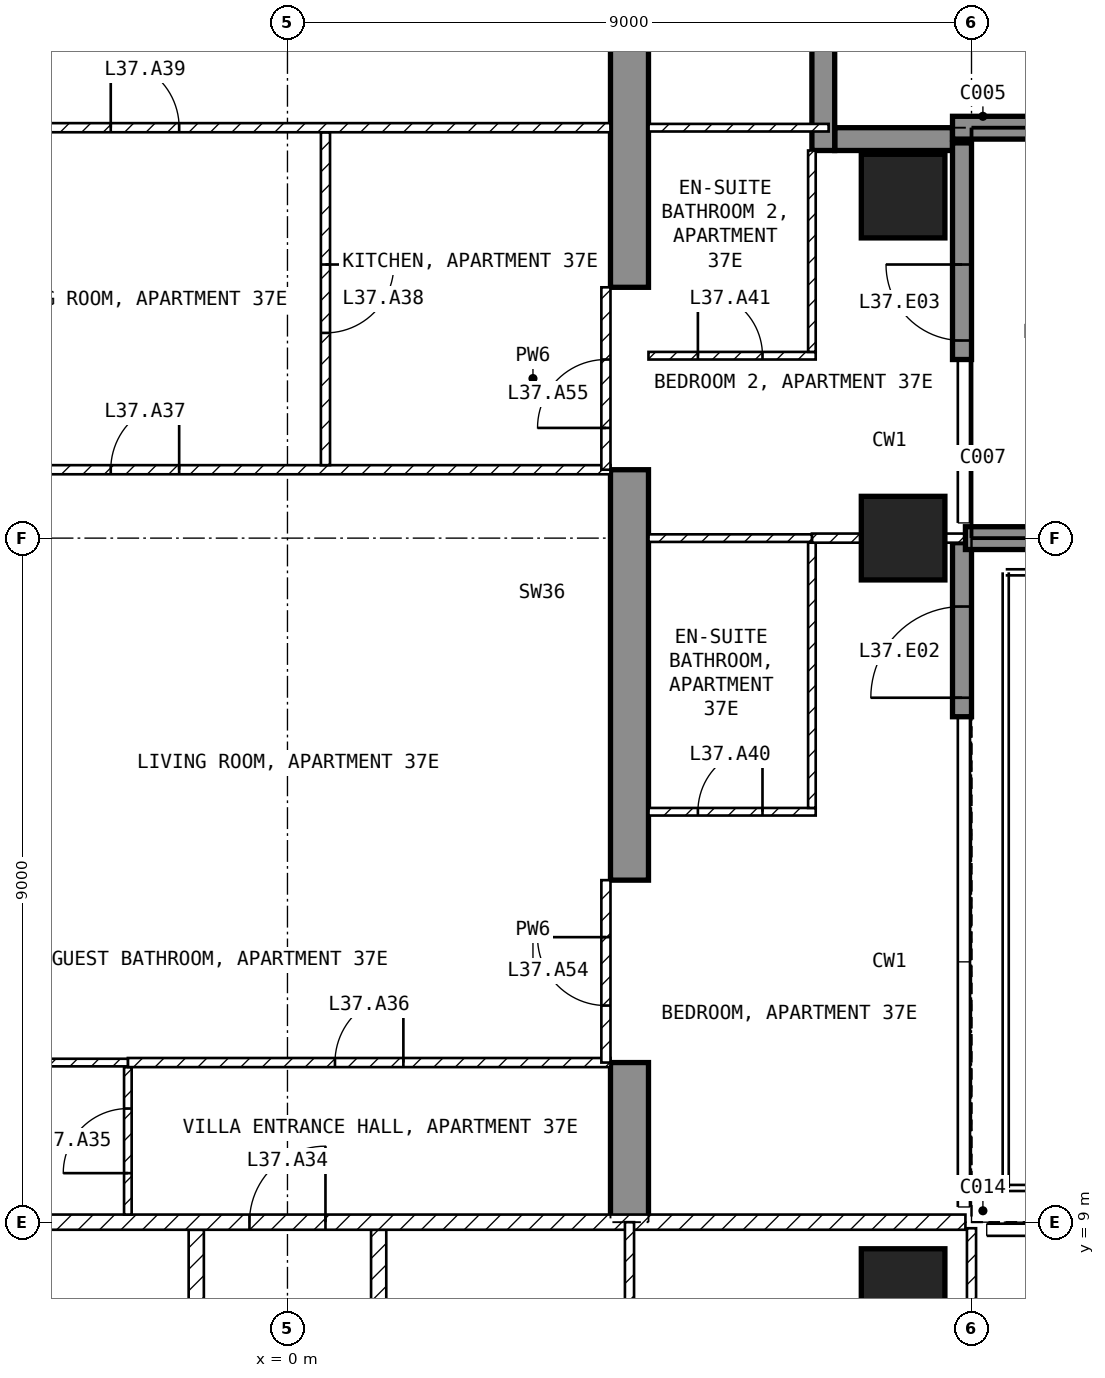
"""IFC4 building model, lengths in metres.
Left out: names, types, materials, properties, quantities, classifications, styles, units other than length and angle.
Written with IfcOpenShell. Run it as: python <this file> out.ifc"""

import sys

from ifc_helpers import new_model, si_unit, direction, frame, frame_2d, origin, origin_2d, place, context, subcontext, project, spatial, polyline, rectangle, outline, extrude, element, fill, save


model = new_model("IFC4")
c1 = context("Model", 3, precision=1e-05, world=origin(), true_north=direction((0.0, 1.0)))
c2 = subcontext(c1, "Body", "Model", "MODEL_VIEW")
j1 = project(units=[si_unit("LENGTHUNIT", "METRE"), si_unit("PLANEANGLEUNIT", "RADIAN")], contexts=[c1])
p1 = place(None, origin())
s1 = spatial("IfcSite", under=j1, at=p1, CompositionType="ELEMENT")
p2 = place(p1, origin())
s2 = spatial("IfcBuilding", under=s1, at=p2, CompositionType="ELEMENT")
p3 = place(p2, frame((0.0, 0.0, 151.4)))
s3 = spatial("IfcBuildingStorey", under=s2, at=p3, CompositionType="ELEMENT", Elevation=151.4)
for number, where, z_axis, x_axis in (
    (1, (8.1, 8.1, -0.25), (0.0, 0.0, 1.0), (1.0, 0.0, 0.0)),
    (2, (8.1, 18.0, -0.25), (0.0, 0.0, 1.0), (1.0, 0.0, 0.0)),
    (3, (8.1, 22.5, -0.25), (0.0, 0.0, 1.0), (1.0, 0.0, 0.0)),
):
    element("IfcColumn", number, at=place(p3, frame(where, z_axis=z_axis, x_axis=x_axis)), inside=s3, PredefinedType="COLUMN", context=c2, shape_type="SweptSolid", body=[
        extrude(rectangle(XDim=1.1, YDim=1.1, at=origin_2d()), origin(), (0.0, 0.0, 1.0), 3.45),
    ])
p4 = place(p3, frame((4.25, 9.0, -0.25), z_axis=(1.0, 0.0, 0.0), x_axis=(0.0, 1.0, 0.0)))
e4 = element("IfcWall", 4, at=p4, inside=s3, PredefinedType="SHEAR", context=c2, shape_type="SweptSolid", body=[
    extrude(outline(polyline([(0.0, 0.0), (2.1, 0.0), (2.1, 2.65), (4.5, 2.65), (4.5, 0.0), (9.9, 0.0), (9.9, 2.65), (12.3, 2.65), (12.3, 0.0), (16.55, 0.0), (16.55, 3.45), (0.0, 3.45), (0.0, 0.0)])), origin(), (0.0, 0.0, 1.0), 0.5),
])
p5 = place(p3, frame((8.875, 15.65, 0.0), z_axis=(0.0, 0.0, 1.0), x_axis=(0.0, 1.0, 0.0)))
e5 = element("IfcWall", 5, at=p5, inside=s3, PredefinedType="SOLIDWALL", context=c2, shape_type="SweptSolid", body=[
    extrude(rectangle(XDim=2.29, YDim=0.25, at=frame_2d((1.145, 0.0))), origin(), (0.0, 0.0, 1.0), 3.2),
])
p6 = place(p5, frame((0.25, 0.0, 0.0)))
e6 = element("IfcOpeningElement", 6, at=p6, cuts=e5, PredefinedType="OPENING", context=c2, shape_type="SweptSolid", body=[
    extrude(rectangle(XDim=1.2, YDim=2.4, at=frame_2d((0.6, 1.2))), frame((0.0, 0.135, 0.0), z_axis=(0.0, -1.0, 0.0), x_axis=(1.0, 0.0, 0.0)), (0.0, 0.0, 1.0), 0.27),
])
p7 = place(p3, frame((8.875, 20.35, 0.0), z_axis=(0.0, 0.0, 1.0), x_axis=(0.0, 1.0, 0.0)))
e7 = element("IfcWall", 7, at=p7, inside=s3, PredefinedType="SOLIDWALL", context=c2, shape_type="SweptSolid", body=[
    extrude(rectangle(XDim=2.85, YDim=0.25, at=frame_2d((1.425, 0.0))), origin(), (0.0, 0.0, 1.0), 3.2),
])
p8 = place(p7, frame((0.25, 0.0, 0.0)))
e8 = element("IfcOpeningElement", 8, at=p8, cuts=e7, PredefinedType="OPENING", context=c2, shape_type="SweptSolid", body=[
    extrude(rectangle(XDim=1.0, YDim=2.4, at=frame_2d((0.5, 1.2))), frame((0.0, 0.135, 0.0), z_axis=(0.0, -1.0, 0.0), x_axis=(1.0, 0.0, 0.0)), (0.0, 0.0, 1.0), 0.27),
])
p9 = place(p3, frame((8.75, 23.25, 0.0), z_axis=(0.0, 0.0, 1.0), x_axis=(-1.0, 0.0, 0.0)))
e9 = element("IfcWall", 9, at=p9, inside=s3, PredefinedType="SOLIDWALL", context=c2, shape_type="SweptSolid", body=[
    extrude(rectangle(XDim=1.55, YDim=0.3, at=frame_2d((0.775, 0.0))), origin(), (0.0, 0.0, 1.0), 3.2),
])
p10 = place(p3, frame((7.05, 23.1, 0.0), z_axis=(0.0, 0.0, 1.0), x_axis=(0.0, 1.0, 0.0)))
e10 = element("IfcWall", 10, at=p10, inside=s3, PredefinedType="SOLIDWALL", context=c2, shape_type="SweptSolid", body=[
    extrude(rectangle(XDim=1.8, YDim=0.3, at=frame_2d((0.9, 0.0))), origin(), (0.0, 0.0, 1.0), 3.2),
])
p11 = place(p3, frame((8.92, 18.0, 0.0), z_axis=(0.0, 0.0, 1.0), x_axis=(1.0, 0.0, 0.0)))
e11 = element("IfcWall", 11, at=p11, inside=s3, PredefinedType="SOLIDWALL", context=c2, shape_type="SweptSolid", body=[
    extrude(rectangle(XDim=2.82, YDim=0.3, at=frame_2d((1.41, 0.0))), origin(), (0.0, 0.0, 1.0), 3.2),
])
p12 = place(p3, frame((8.75, 23.4, 0.0), z_axis=(0.0, 0.0, 1.0), x_axis=(1.0, 0.0, 0.0)))
e12 = element("IfcWall", 12, at=p12, inside=s3, PredefinedType="SOLIDWALL", context=c2, shape_type="SweptSolid", body=[
    extrude(rectangle(XDim=2.95, YDim=0.3, at=frame_2d((1.475, 0.0))), origin(), (0.0, 0.0, 1.0), 3.2),
])
for number, where, z_axis, x_axis in (
    (13, (1.2, 8.9, 0.0), (0.0, 0.0, 1.0), (0.0, -1.0, 0.0)),
    (14, (-1.2, 4.6, 0.0), (0.0, 0.0, 1.0), (0.0, 1.0, 0.0)),
):
    element("IfcWall", number, at=place(p3, frame(where, z_axis=z_axis, x_axis=x_axis)), inside=s3, PredefinedType="PARTITIONING", context=c2, shape_type="SweptSolid", body=[
        extrude(rectangle(XDim=4.3, YDim=0.2, at=frame_2d((2.15, 0.0))), origin(), (0.0, 0.0, 1.0), 3.2),
    ])
p13 = place(p3, frame((-8.92, 9.0, 0.0), z_axis=(0.0, 0.0, 1.0), x_axis=(1.0, 0.0, 0.0)))
e15 = element("IfcWall", 15, at=p13, inside=s3, PredefinedType="PARTITIONING", context=c2, shape_type="SweptSolid", body=[
    extrude(rectangle(XDim=17.84, YDim=0.2, at=frame_2d((8.92, 0.0))), origin(), (0.0, 0.0, 1.0), 3.2),
])
p14 = place(p13, frame((8.42, 0.0, 0.0)))
e16 = element("IfcOpeningElement", 16, at=p14, cuts=e15, PredefinedType="OPENING", context=c2, shape_type="SweptSolid", body=[
    extrude(rectangle(XDim=1.0, YDim=2.1, at=frame_2d((0.5, 1.05))), frame((0.0, 0.11, 0.0), z_axis=(0.0, -1.0, 0.0), x_axis=(1.0, 0.0, 0.0)), (0.0, 0.0, 1.0), 0.22),
])
p15 = place(p3, frame((9.0, 4.8, 0.0), z_axis=(0.0, 0.0, 1.0), x_axis=(0.0, 1.0, 0.0)))
e17 = element("IfcWall", 17, at=p15, inside=s3, PredefinedType="PARTITIONING", context=c2, shape_type="SweptSolid", body=[
    extrude(rectangle(XDim=4.12, YDim=0.12, at=frame_2d((2.06, 0.0))), origin(), (0.0, 0.0, 1.0), 3.2),
])
p16 = place(p15, frame((0.7, 0.0, 0.0)))
e18 = element("IfcOpeningElement", 18, at=p16, cuts=e17, PredefinedType="OPENING", context=c2, shape_type="SweptSolid", body=[
    extrude(rectangle(XDim=0.9, YDim=2.1, at=frame_2d((0.45, 1.05))), frame((0.0, 0.07, 0.0), z_axis=(0.0, -1.0, 0.0), x_axis=(1.0, 0.0, 0.0)), (0.0, 0.0, 1.0), 0.14),
])
p17 = place(p3, frame((4.5, 4.5, 0.0), z_axis=(0.0, 0.0, 1.0), x_axis=(0.0, 1.0, 0.0)))
e19 = element("IfcWall", 19, at=p17, inside=s3, PredefinedType="PARTITIONING", context=c2, shape_type="SweptSolid", body=[
    extrude(rectangle(XDim=4.5, YDim=0.12, at=frame_2d((2.25, 0.0))), origin(), (0.0, 0.0, 1.0), 3.2),
])
p18 = place(p17, frame((1.8, 0.0, 0.0)))
e20 = element("IfcOpeningElement", 20, at=p18, cuts=e19, PredefinedType="OPENING", context=c2, shape_type="SweptSolid", body=[
    extrude(rectangle(XDim=0.9, YDim=2.1, at=frame_2d((0.45, 1.05))), frame((0.0, 0.07, 0.0), z_axis=(0.0, -1.0, 0.0), x_axis=(1.0, 0.0, 0.0)), (0.0, 0.0, 1.0), 0.14),
])
p19 = place(p3, frame((-2.1, 9.1, 0.0), z_axis=(0.0, 0.0, 1.0), x_axis=(0.0, 1.0, 0.0)))
e21 = element("IfcWall", 21, at=p19, inside=s3, PredefinedType="PARTITIONING", context=c2, shape_type="SweptSolid", body=[
    extrude(rectangle(XDim=1.94, YDim=0.1, at=frame_2d((0.97, 0.0))), origin(), (0.0, 0.0, 1.0), 3.2),
])
p20 = place(p19, frame((0.545, 0.0, 0.0)))
e22 = element("IfcOpeningElement", 22, at=p20, cuts=e21, PredefinedType="OPENING", context=c2, shape_type="SweptSolid", body=[
    extrude(rectangle(XDim=0.85, YDim=2.1, at=frame_2d((0.425, 1.05))), frame((0.0, 0.06, 0.0), z_axis=(0.0, -1.0, 0.0), x_axis=(1.0, 0.0, 0.0)), (0.0, 0.0, 1.0), 0.12),
])
p21 = place(p3, frame((-2.1, 11.1, 0.0), z_axis=(0.0, 0.0, 1.0), x_axis=(1.0, 0.0, 0.0)))
e23 = element("IfcWall", 23, at=p21, inside=s3, PredefinedType="PARTITIONING", context=c2, shape_type="SweptSolid", body=[
    extrude(rectangle(XDim=6.35, YDim=0.12, at=frame_2d((3.175, 0.0))), origin(), (0.0, 0.0, 1.0), 3.2),
])
p22 = place(p21, frame((2.725, 0.0, 0.0)))
e24 = element("IfcOpeningElement", 24, at=p22, cuts=e23, PredefinedType="OPENING", context=c2, shape_type="SweptSolid", body=[
    extrude(rectangle(XDim=0.9, YDim=2.1, at=frame_2d((0.45, 1.05))), frame((0.0, 0.07, 0.0), z_axis=(0.0, -1.0, 0.0), x_axis=(1.0, 0.0, 0.0)), (0.0, 0.0, 1.0), 0.14),
])
p23 = place(p3, frame((-4.25, 11.1, 0.0), z_axis=(0.0, 0.0, 1.0), x_axis=(1.0, 0.0, 0.0)))
e25 = element("IfcWall", 25, at=p23, inside=s3, PredefinedType="PARTITIONING", context=c2, shape_type="SweptSolid", body=[
    extrude(rectangle(XDim=2.15, YDim=0.1, at=frame_2d((1.075, 0.0))), origin(), (0.0, 0.0, 1.0), 3.2),
])
p24 = place(p3, frame((-4.25, 18.9, 0.0), z_axis=(0.0, 0.0, 1.0), x_axis=(1.0, 0.0, 0.0)))
e26 = element("IfcWall", 26, at=p24, inside=s3, PredefinedType="PARTITIONING", context=c2, shape_type="SweptSolid", body=[
    extrude(rectangle(XDim=8.5, YDim=0.12, at=frame_2d((4.25, 0.0))), origin(), (0.0, 0.0, 1.0), 3.2),
])
p25 = place(p24, frame((1.925, 0.0, 0.0)))
e27 = element("IfcOpeningElement", 27, at=p25, cuts=e26, PredefinedType="OPENING", context=c2, shape_type="SweptSolid", body=[
    extrude(rectangle(XDim=0.9, YDim=2.1, at=frame_2d((0.45, 1.05))), frame((0.0, 0.07, 0.0), z_axis=(0.0, -1.0, 0.0), x_axis=(1.0, 0.0, 0.0)), (0.0, 0.0, 1.0), 0.14),
])
p26 = place(p3, frame((0.5, 23.34, 0.0), z_axis=(0.0, 0.0, 1.0), x_axis=(0.0, -1.0, 0.0)))
e28 = element("IfcWall", 28, at=p26, inside=s3, PredefinedType="PARTITIONING", context=c2, shape_type="SweptSolid", body=[
    extrude(rectangle(XDim=4.38, YDim=0.12, at=frame_2d((2.19, 0.0))), origin(), (0.0, 0.0, 1.0), 3.2),
])
p27 = place(p26, frame((1.74, 0.0, 0.0)))
e29 = element("IfcOpeningElement", 29, at=p27, cuts=e28, PredefinedType="OPENING", context=c2, shape_type="SweptSolid", body=[
    extrude(rectangle(XDim=0.9, YDim=2.1, at=frame_2d((0.45, 1.05))), frame((0.0, 0.07, 0.0), z_axis=(0.0, -1.0, 0.0), x_axis=(1.0, 0.0, 0.0)), (0.0, 0.0, 1.0), 0.14),
])
p28 = place(p3, frame((-4.25, 23.4, 0.0), z_axis=(0.0, 0.0, 1.0), x_axis=(1.0, 0.0, 0.0)))
e30 = element("IfcWall", 30, at=p28, inside=s3, PredefinedType="PARTITIONING", context=c2, shape_type="SweptSolid", body=[
    extrude(rectangle(XDim=8.5, YDim=0.12, at=frame_2d((4.25, 0.0))), origin(), (0.0, 0.0, 1.0), 3.2),
])
p29 = place(p28, frame((1.925, 0.0, 0.0)))
e31 = element("IfcOpeningElement", 31, at=p29, cuts=e30, PredefinedType="OPENING", context=c2, shape_type="SweptSolid", body=[
    extrude(rectangle(XDim=0.9, YDim=2.1, at=frame_2d((0.45, 1.05))), frame((0.0, 0.07, 0.0), z_axis=(0.0, -1.0, 0.0), x_axis=(1.0, 0.0, 0.0)), (0.0, 0.0, 1.0), 0.14),
])
p30 = place(p3, frame((4.75, 14.4, 0.0), z_axis=(0.0, 0.0, 1.0), x_axis=(1.0, 0.0, 0.0)))
e32 = element("IfcWall", 32, at=p30, inside=s3, PredefinedType="PARTITIONING", context=c2, shape_type="SweptSolid", body=[
    extrude(rectangle(XDim=2.2, YDim=0.1, at=frame_2d((1.1, 0.0))), origin(), (0.0, 0.0, 1.0), 3.2),
])
p31 = place(p30, frame((0.65, 0.0, 0.0)))
e33 = element("IfcOpeningElement", 33, at=p31, cuts=e32, PredefinedType="OPENING", context=c2, shape_type="SweptSolid", body=[
    extrude(rectangle(XDim=0.85, YDim=2.1, at=frame_2d((0.425, 1.05))), frame((0.0, 0.06, 0.0), z_axis=(0.0, -1.0, 0.0), x_axis=(1.0, 0.0, 0.0)), (0.0, 0.0, 1.0), 0.12),
])
p32 = place(p3, frame((6.9, 14.45, 0.0), z_axis=(0.0, 0.0, 1.0), x_axis=(0.0, 1.0, 0.0)))
e34 = element("IfcWall", 34, at=p32, inside=s3, PredefinedType="PARTITIONING", context=c2, shape_type="SweptSolid", body=[
    extrude(rectangle(XDim=3.49, YDim=0.1, at=frame_2d((1.745, 0.0))), origin(), (0.0, 0.0, 1.0), 3.2),
])
p33 = place(p3, frame((6.9, 18.0, 0.0), z_axis=(0.0, 0.0, 1.0), x_axis=(1.0, 0.0, 0.0)))
e35 = element("IfcWall", 35, at=p33, inside=s3, PredefinedType="PARTITIONING", context=c2, shape_type="SweptSolid", body=[
    extrude(rectangle(XDim=2.02, YDim=0.12, at=frame_2d((1.01, 0.0))), origin(), (0.0, 0.0, 1.0), 2.364),
])
p34 = place(p3, frame((4.75, 18.0, 0.0), z_axis=(0.0, 0.0, 1.0), x_axis=(1.0, 0.0, 0.0)))
e36 = element("IfcWall", 36, at=p34, inside=s3, PredefinedType="PARTITIONING", context=c2, shape_type="SweptSolid", body=[
    extrude(rectangle(XDim=2.15, YDim=0.1, at=frame_2d((1.075, 0.0))), origin(), (0.0, 0.0, 1.0), 2.364),
])
p35 = place(p3, frame((4.75, 20.4, 0.0), z_axis=(0.0, 0.0, 1.0), x_axis=(1.0, 0.0, 0.0)))
e37 = element("IfcWall", 37, at=p35, inside=s3, PredefinedType="PARTITIONING", context=c2, shape_type="SweptSolid", body=[
    extrude(rectangle(XDim=2.2, YDim=0.1, at=frame_2d((1.1, 0.0))), origin(), (0.0, 0.0, 1.0), 3.2),
])
p36 = place(p35, frame((0.65, 0.0, 0.0)))
e38 = element("IfcOpeningElement", 38, at=p36, cuts=e37, PredefinedType="OPENING", context=c2, shape_type="SweptSolid", body=[
    extrude(rectangle(XDim=0.85, YDim=2.1, at=frame_2d((0.425, 1.05))), frame((0.0, 0.06, 0.0), z_axis=(0.0, -1.0, 0.0), x_axis=(1.0, 0.0, 0.0)), (0.0, 0.0, 1.0), 0.12),
])
p37 = place(p3, frame((6.9, 20.45, 0.0), z_axis=(0.0, 0.0, 1.0), x_axis=(0.0, 1.0, 0.0)))
e39 = element("IfcWall", 39, at=p37, inside=s3, PredefinedType="PARTITIONING", context=c2, shape_type="SweptSolid", body=[
    extrude(rectangle(XDim=2.65, YDim=0.1, at=frame_2d((1.325, 0.0))), origin(), (0.0, 0.0, 1.0), 3.2),
])
p38 = place(p3, frame((4.75, 23.4, 0.0), z_axis=(0.0, 0.0, 1.0), x_axis=(1.0, 0.0, 0.0)))
e40 = element("IfcWall", 40, at=p38, inside=s3, PredefinedType="PARTITIONING", context=c2, shape_type="SweptSolid", body=[
    extrude(rectangle(XDim=2.37, YDim=0.1, at=frame_2d((1.185, 0.0))), origin(), (0.0, 0.0, 1.0), 3.2),
])
p39 = place(p3, frame((4.19, 11.1, 0.0), z_axis=(0.0, 0.0, 1.0), x_axis=(0.0, 1.0, 0.0)))
e41 = element("IfcWall", 41, at=p39, inside=s3, PredefinedType="PARTITIONING", context=c2, shape_type="SweptSolid", body=[
    extrude(rectangle(XDim=2.4, YDim=0.12, at=frame_2d((1.2, 0.0))), origin(), (0.0, 0.0, 1.0), 2.4),
])
p40 = place(p39, frame((0.75, 0.0, 0.0)))
e42 = element("IfcOpeningElement", 42, at=p40, cuts=e41, PredefinedType="OPENING", context=c2, shape_type="SweptSolid", body=[
    extrude(rectangle(XDim=0.9, YDim=2.1, at=frame_2d((0.45, 1.05))), frame((0.0, 0.07, 0.0), z_axis=(0.0, -1.0, 0.0), x_axis=(1.0, 0.0, 0.0)), (0.0, 0.0, 1.0), 0.14),
])
p41 = place(p3, frame((4.19, 18.9, 0.0), z_axis=(0.0, 0.0, 1.0), x_axis=(0.0, 1.0, 0.0)))
e43 = element("IfcWall", 43, at=p41, inside=s3, PredefinedType="PARTITIONING", context=c2, shape_type="SweptSolid", body=[
    extrude(rectangle(XDim=2.4, YDim=0.12, at=frame_2d((1.2, 0.0))), origin(), (0.0, 0.0, 1.0), 2.4),
])
p42 = place(p41, frame((0.55, 0.0, 0.0)))
e44 = element("IfcOpeningElement", 44, at=p42, cuts=e43, PredefinedType="OPENING", context=c2, shape_type="SweptSolid", body=[
    extrude(rectangle(XDim=0.9, YDim=2.1, at=frame_2d((0.45, 1.05))), frame((0.0, 0.07, 0.0), z_axis=(0.0, -1.0, 0.0), x_axis=(1.0, 0.0, 0.0)), (0.0, 0.0, 1.0), 0.14),
])
p43 = place(p6, origin())
e45 = element("IfcDoor", 45, at=p43, inside=s3, OperationType="SINGLE_SWING_LEFT", PredefinedType="DOOR", context=c2, shape_type="SweptSolid", body=[
    extrude(rectangle(XDim=1.2, YDim=2.4, at=frame_2d((0.6, 1.2))), frame((0.0, 0.025, 0.0), z_axis=(0.0, -1.0, 0.0), x_axis=(1.0, 0.0, 0.0)), (0.0, 0.0, 1.0), 0.05),
])
fill(e6, e45)
p44 = place(p8, origin())
e46 = element("IfcDoor", 46, at=p44, inside=s3, OperationType="SINGLE_SWING_RIGHT", PredefinedType="DOOR", context=c2, shape_type="SweptSolid", body=[
    extrude(rectangle(XDim=1.0, YDim=2.4, at=frame_2d((0.5, 1.2))), frame((0.0, 0.025, 0.0), z_axis=(0.0, -1.0, 0.0), x_axis=(1.0, 0.0, 0.0)), (0.0, 0.0, 1.0), 0.05),
])
fill(e8, e46)
p45 = place(p14, origin())
e47 = element("IfcDoor", 47, at=p45, inside=s3, OperationType="SINGLE_SWING_RIGHT", PredefinedType="DOOR", context=c2, shape_type="SweptSolid", body=[
    extrude(rectangle(XDim=1.0, YDim=2.1, at=frame_2d((0.5, 1.05))), frame((0.0, 0.025, 0.0), z_axis=(0.0, -1.0, 0.0), x_axis=(1.0, 0.0, 0.0)), (0.0, 0.0, 1.0), 0.05),
])
fill(e16, e47)
p46 = place(p20, origin())
e48 = element("IfcDoor", 48, at=p46, inside=s3, OperationType="SINGLE_SWING_LEFT", PredefinedType="DOOR", context=c2, shape_type="SweptSolid", body=[
    extrude(rectangle(XDim=0.85, YDim=2.1, at=frame_2d((0.425, 1.05))), frame((0.0, 0.025, 0.0), z_axis=(0.0, -1.0, 0.0), x_axis=(1.0, 0.0, 0.0)), (0.0, 0.0, 1.0), 0.05),
])
fill(e22, e48)
p47 = place(p22, origin())
e49 = element("IfcDoor", 49, at=p47, inside=s3, OperationType="SINGLE_SWING_RIGHT", PredefinedType="DOOR", context=c2, shape_type="SweptSolid", body=[
    extrude(rectangle(XDim=0.9, YDim=2.1, at=frame_2d((0.45, 1.05))), frame((0.0, 0.025, 0.0), z_axis=(0.0, -1.0, 0.0), x_axis=(1.0, 0.0, 0.0)), (0.0, 0.0, 1.0), 0.05),
])
fill(e24, e49)
p48 = place(p25, origin())
e50 = element("IfcDoor", 50, at=p48, inside=s3, OperationType="SINGLE_SWING_RIGHT", PredefinedType="DOOR", context=c2, shape_type="SweptSolid", body=[
    extrude(rectangle(XDim=0.9, YDim=2.1, at=frame_2d((0.45, 1.05))), frame((0.0, 0.025, 0.0), z_axis=(0.0, -1.0, 0.0), x_axis=(1.0, 0.0, 0.0)), (0.0, 0.0, 1.0), 0.05),
])
fill(e27, e50)
p49 = place(p27, origin())
e51 = element("IfcDoor", 51, at=p49, inside=s3, OperationType="SINGLE_SWING_LEFT", PredefinedType="DOOR", context=c2, shape_type="SweptSolid", body=[
    extrude(rectangle(XDim=0.9, YDim=2.1, at=frame_2d((0.45, 1.05))), frame((0.0, 0.025, 0.0), z_axis=(0.0, -1.0, 0.0), x_axis=(1.0, 0.0, 0.0)), (0.0, 0.0, 1.0), 0.05),
])
fill(e29, e51)
p50 = place(p29, origin())
e52 = element("IfcDoor", 52, at=p50, inside=s3, OperationType="SINGLE_SWING_LEFT", PredefinedType="DOOR", context=c2, shape_type="SweptSolid", body=[
    extrude(rectangle(XDim=0.9, YDim=2.1, at=frame_2d((0.45, 1.05))), frame((0.0, 0.025, 0.0), z_axis=(0.0, -1.0, 0.0), x_axis=(1.0, 0.0, 0.0)), (0.0, 0.0, 1.0), 0.05),
])
fill(e31, e52)
p51 = place(p31, origin())
e53 = element("IfcDoor", 53, at=p51, inside=s3, OperationType="SINGLE_SWING_RIGHT", PredefinedType="DOOR", context=c2, shape_type="SweptSolid", body=[
    extrude(rectangle(XDim=0.85, YDim=2.1, at=frame_2d((0.425, 1.05))), frame((0.0, 0.025, 0.0), z_axis=(0.0, -1.0, 0.0), x_axis=(1.0, 0.0, 0.0)), (0.0, 0.0, 1.0), 0.05),
])
fill(e33, e53)
p52 = place(p36, origin())
e54 = element("IfcDoor", 54, at=p52, inside=s3, OperationType="SINGLE_SWING_LEFT", PredefinedType="DOOR", context=c2, shape_type="SweptSolid", body=[
    extrude(rectangle(XDim=0.85, YDim=2.1, at=frame_2d((0.425, 1.05))), frame((0.0, 0.025, 0.0), z_axis=(0.0, -1.0, 0.0), x_axis=(1.0, 0.0, 0.0)), (0.0, 0.0, 1.0), 0.05),
])
fill(e38, e54)
p53 = place(p40, origin())
e55 = element("IfcDoor", 55, at=p53, inside=s3, OperationType="SINGLE_SWING_RIGHT", PredefinedType="DOOR", context=c2, shape_type="SweptSolid", body=[
    extrude(rectangle(XDim=0.9, YDim=2.1, at=frame_2d((0.45, 1.05))), frame((0.0, 0.025, 0.0), z_axis=(0.0, -1.0, 0.0), x_axis=(1.0, 0.0, 0.0)), (0.0, 0.0, 1.0), 0.05),
])
fill(e42, e55)
p54 = place(p42, origin())
e56 = element("IfcDoor", 56, at=p54, inside=s3, OperationType="SINGLE_SWING_LEFT", PredefinedType="DOOR", context=c2, shape_type="SweptSolid", body=[
    extrude(rectangle(XDim=0.9, YDim=2.1, at=frame_2d((0.45, 1.05))), frame((0.0, 0.025, 0.0), z_axis=(0.0, -1.0, 0.0), x_axis=(1.0, 0.0, 0.0)), (0.0, 0.0, 1.0), 0.05),
])
fill(e44, e56)
save(model, sys.argv[1])
